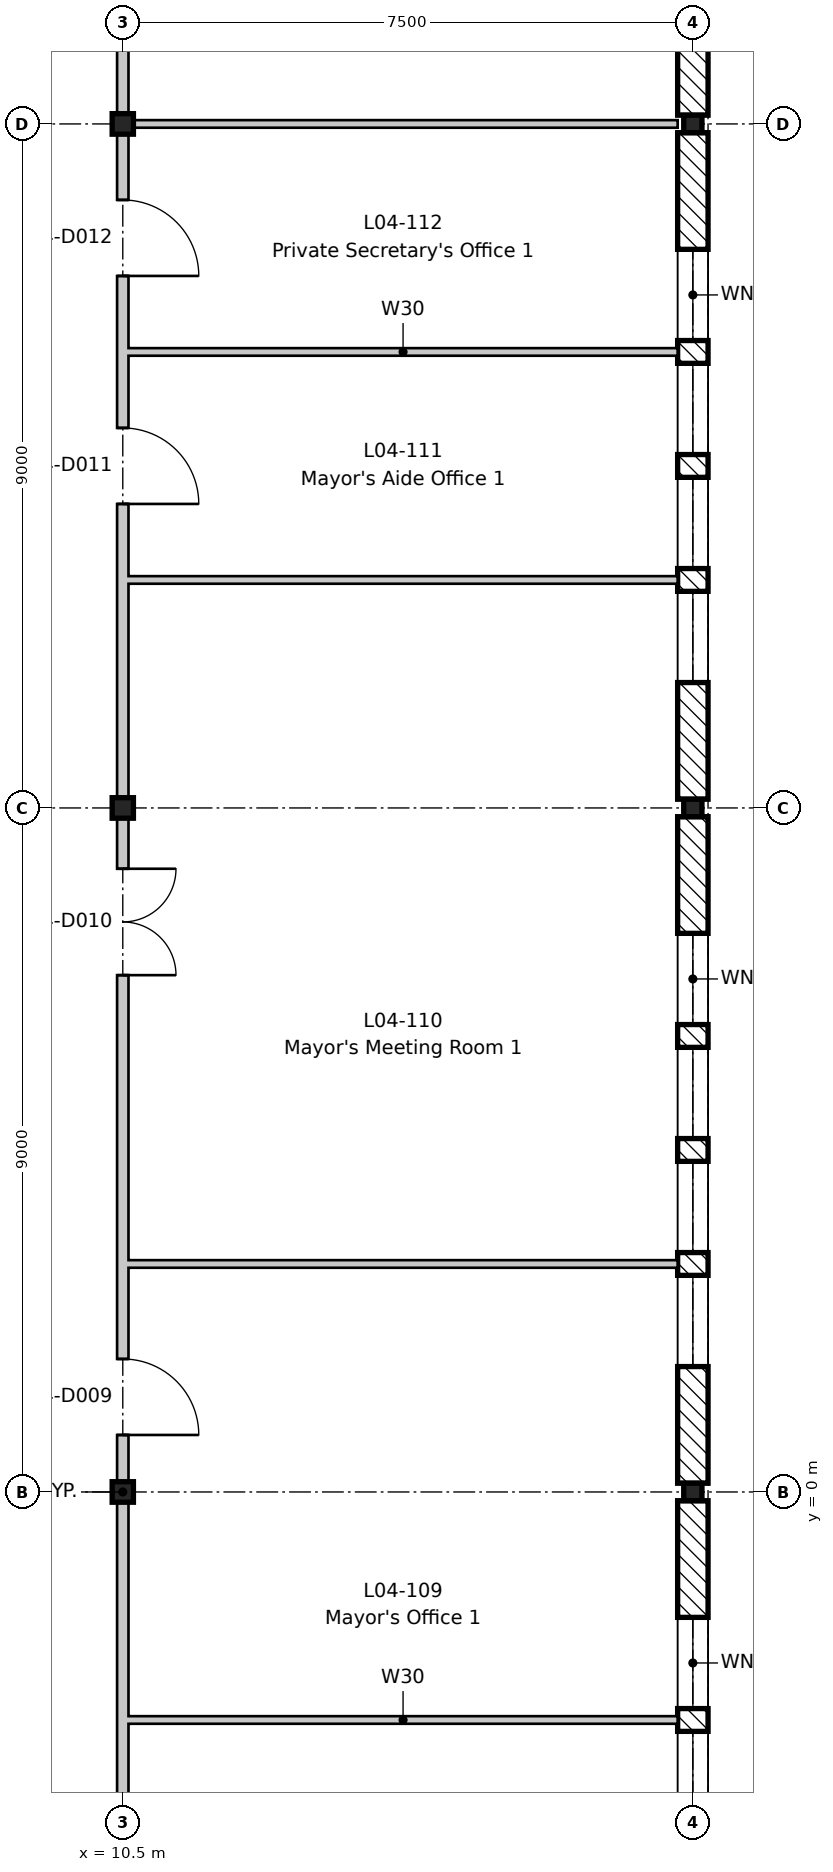
"""IFC4 building model, lengths in metres.
Left out: names, types, materials, properties, quantities, classifications, styles, units other than length and angle.
Written with IfcOpenShell. Run it as: python <this file> out.ifc"""

import sys

from ifc_helpers import new_model, si_unit, direction, frame, frame_2d, origin, origin_2d, place, context, subcontext, project, spatial, rectangle, i_section, extrude, element, fill, save


model = new_model("IFC4")
c1 = context("Model", 3, precision=1e-05, world=origin(), true_north=direction((0.0, 1.0)))
c2 = subcontext(c1, "Body", "Model", "MODEL_VIEW")
j1 = project(units=[si_unit("LENGTHUNIT", "METRE"), si_unit("PLANEANGLEUNIT", "RADIAN")], contexts=[c1])
p1 = place(None, origin())
s1 = spatial("IfcSite", under=j1, at=p1, CompositionType="ELEMENT")
p2 = place(p1, origin())
s2 = spatial("IfcBuilding", under=s1, at=p2, CompositionType="ELEMENT")
p3 = place(p2, frame((0.0, 0.0, 18.6)))
s3 = spatial("IfcBuildingStorey", under=s2, at=p3, CompositionType="ELEMENT", Elevation=18.6)
for number, where, z_axis, x_axis in (
    (1, (10.5, 0.0, -0.2), (0.0, 0.0, 1.0), (1.0, 0.0, 0.0)),
    (2, (10.5, 9.0, -0.2), (0.0, 0.0, 1.0), (1.0, 0.0, 0.0)),
    (3, (10.5, 18.0, -0.2), (0.0, 0.0, 1.0), (1.0, 0.0, 0.0)),
):
    element("IfcColumn", number, at=place(p3, frame(where, z_axis=z_axis, x_axis=x_axis)), inside=s3, PredefinedType="COLUMN", context=c2, shape_type="SweptSolid", body=[
        extrude(i_section(OverallWidth=0.28, OverallDepth=0.27, WebThickness=0.008, FlangeThickness=0.013, FilletRadius=0.024, at=origin_2d()), origin(), (0.0, 0.0, 1.0), 4.2),
    ])
for number, where, z_axis, x_axis in (
    (4, (18.0, 0.0, -0.2), (0.0, 0.0, 1.0), (1.0, 0.0, 0.0)),
    (5, (18.0, 9.0, -0.2), (0.0, 0.0, 1.0), (1.0, 0.0, 0.0)),
    (6, (18.0, 18.0, -0.2), (0.0, 0.0, 1.0), (1.0, 0.0, 0.0)),
):
    element("IfcColumn", number, at=place(p3, frame(where, z_axis=z_axis, x_axis=x_axis)), inside=s3, PredefinedType="COLUMN", context=c2, shape_type="SweptSolid", body=[
        extrude(i_section(OverallWidth=0.24, OverallDepth=0.23, WebThickness=0.008, FlangeThickness=0.012, FilletRadius=0.021, at=origin_2d()), origin(), (0.0, 0.0, 1.0), 4.2),
    ])
p4 = place(p3, frame((18.0, -0.115, 0.0), z_axis=(0.0, 0.0, 1.0), x_axis=(0.0, -1.0, 0.0)))
e7 = element("IfcWall", 7, at=p4, inside=s3, PredefinedType="STANDARD", context=c2, shape_type="SweptSolid", body=[
    extrude(rectangle(XDim=8.77, YDim=0.4, at=frame_2d((4.385, 0.0))), origin(), (0.0, 0.0, 1.0), 3.6),
])
p5 = place(p4, frame((6.035, 0.0, 0.6)))
e8 = element("IfcOpeningElement", 8, at=p5, cuts=e7, PredefinedType="OPENING", context=c2, shape_type="SweptSolid", body=[
    extrude(rectangle(XDim=1.2, YDim=2.7, at=frame_2d((0.6, 1.35))), frame((0.0, 0.21, 0.0), z_axis=(0.0, -1.0, 0.0), x_axis=(1.0, 0.0, 0.0)), (0.0, 0.0, 1.0), 0.42),
])
p6 = place(p4, frame((4.535, 0.0, 0.6)))
e9 = element("IfcOpeningElement", 9, at=p6, cuts=e7, PredefinedType="OPENING", context=c2, shape_type="SweptSolid", body=[
    extrude(rectangle(XDim=1.2, YDim=2.7, at=frame_2d((0.6, 1.35))), frame((0.0, 0.21, 0.0), z_axis=(0.0, -1.0, 0.0), x_axis=(1.0, 0.0, 0.0)), (0.0, 0.0, 1.0), 0.42),
])
p7 = place(p4, frame((3.035, 0.0, 0.6)))
e10 = element("IfcOpeningElement", 10, at=p7, cuts=e7, PredefinedType="OPENING", context=c2, shape_type="SweptSolid", body=[
    extrude(rectangle(XDim=1.2, YDim=2.7, at=frame_2d((0.6, 1.35))), frame((0.0, 0.21, 0.0), z_axis=(0.0, -1.0, 0.0), x_axis=(1.0, 0.0, 0.0)), (0.0, 0.0, 1.0), 0.42),
])
p8 = place(p4, frame((1.535, 0.0, 0.6)))
e11 = element("IfcOpeningElement", 11, at=p8, cuts=e7, PredefinedType="OPENING", context=c2, shape_type="SweptSolid", body=[
    extrude(rectangle(XDim=1.2, YDim=2.7, at=frame_2d((0.6, 1.35))), frame((0.0, 0.21, 0.0), z_axis=(0.0, -1.0, 0.0), x_axis=(1.0, 0.0, 0.0)), (0.0, 0.0, 1.0), 0.42),
])
p9 = place(p3, frame((18.0, 8.885, 0.0), z_axis=(0.0, 0.0, 1.0), x_axis=(0.0, -1.0, 0.0)))
e12 = element("IfcWall", 12, at=p9, inside=s3, PredefinedType="STANDARD", context=c2, shape_type="SweptSolid", body=[
    extrude(rectangle(XDim=8.77, YDim=0.4, at=frame_2d((4.385, 0.0))), origin(), (0.0, 0.0, 1.0), 3.6),
])
p10 = place(p9, frame((6.035, 0.0, 0.6)))
e13 = element("IfcOpeningElement", 13, at=p10, cuts=e12, PredefinedType="OPENING", context=c2, shape_type="SweptSolid", body=[
    extrude(rectangle(XDim=1.2, YDim=2.7, at=frame_2d((0.6, 1.35))), frame((0.0, 0.21, 0.0), z_axis=(0.0, -1.0, 0.0), x_axis=(1.0, 0.0, 0.0)), (0.0, 0.0, 1.0), 0.42),
])
p11 = place(p9, frame((4.535, 0.0, 0.6)))
e14 = element("IfcOpeningElement", 14, at=p11, cuts=e12, PredefinedType="OPENING", context=c2, shape_type="SweptSolid", body=[
    extrude(rectangle(XDim=1.2, YDim=2.7, at=frame_2d((0.6, 1.35))), frame((0.0, 0.21, 0.0), z_axis=(0.0, -1.0, 0.0), x_axis=(1.0, 0.0, 0.0)), (0.0, 0.0, 1.0), 0.42),
])
p12 = place(p9, frame((3.035, 0.0, 0.6)))
e15 = element("IfcOpeningElement", 15, at=p12, cuts=e12, PredefinedType="OPENING", context=c2, shape_type="SweptSolid", body=[
    extrude(rectangle(XDim=1.2, YDim=2.7, at=frame_2d((0.6, 1.35))), frame((0.0, 0.21, 0.0), z_axis=(0.0, -1.0, 0.0), x_axis=(1.0, 0.0, 0.0)), (0.0, 0.0, 1.0), 0.42),
])
p13 = place(p9, frame((1.535, 0.0, 0.6)))
e16 = element("IfcOpeningElement", 16, at=p13, cuts=e12, PredefinedType="OPENING", context=c2, shape_type="SweptSolid", body=[
    extrude(rectangle(XDim=1.2, YDim=2.7, at=frame_2d((0.6, 1.35))), frame((0.0, 0.21, 0.0), z_axis=(0.0, -1.0, 0.0), x_axis=(1.0, 0.0, 0.0)), (0.0, 0.0, 1.0), 0.42),
])
p14 = place(p3, frame((18.0, 17.885, 0.0), z_axis=(0.0, 0.0, 1.0), x_axis=(0.0, -1.0, 0.0)))
e17 = element("IfcWall", 17, at=p14, inside=s3, PredefinedType="STANDARD", context=c2, shape_type="SweptSolid", body=[
    extrude(rectangle(XDim=8.77, YDim=0.4, at=frame_2d((4.385, 0.0))), origin(), (0.0, 0.0, 1.0), 3.6),
])
p15 = place(p14, frame((6.035, 0.0, 0.6)))
e18 = element("IfcOpeningElement", 18, at=p15, cuts=e17, PredefinedType="OPENING", context=c2, shape_type="SweptSolid", body=[
    extrude(rectangle(XDim=1.2, YDim=2.7, at=frame_2d((0.6, 1.35))), frame((0.0, 0.21, 0.0), z_axis=(0.0, -1.0, 0.0), x_axis=(1.0, 0.0, 0.0)), (0.0, 0.0, 1.0), 0.42),
])
p16 = place(p14, frame((4.535, 0.0, 0.6)))
e19 = element("IfcOpeningElement", 19, at=p16, cuts=e17, PredefinedType="OPENING", context=c2, shape_type="SweptSolid", body=[
    extrude(rectangle(XDim=1.2, YDim=2.7, at=frame_2d((0.6, 1.35))), frame((0.0, 0.21, 0.0), z_axis=(0.0, -1.0, 0.0), x_axis=(1.0, 0.0, 0.0)), (0.0, 0.0, 1.0), 0.42),
])
p17 = place(p14, frame((3.035, 0.0, 0.6)))
e20 = element("IfcOpeningElement", 20, at=p17, cuts=e17, PredefinedType="OPENING", context=c2, shape_type="SweptSolid", body=[
    extrude(rectangle(XDim=1.2, YDim=2.7, at=frame_2d((0.6, 1.35))), frame((0.0, 0.21, 0.0), z_axis=(0.0, -1.0, 0.0), x_axis=(1.0, 0.0, 0.0)), (0.0, 0.0, 1.0), 0.42),
])
p18 = place(p14, frame((1.535, 0.0, 0.6)))
e21 = element("IfcOpeningElement", 21, at=p18, cuts=e17, PredefinedType="OPENING", context=c2, shape_type="SweptSolid", body=[
    extrude(rectangle(XDim=1.2, YDim=2.7, at=frame_2d((0.6, 1.35))), frame((0.0, 0.21, 0.0), z_axis=(0.0, -1.0, 0.0), x_axis=(1.0, 0.0, 0.0)), (0.0, 0.0, 1.0), 0.42),
])
p19 = place(p3, frame((18.0, 26.885, 0.0), z_axis=(0.0, 0.0, 1.0), x_axis=(0.0, -1.0, 0.0)))
e22 = element("IfcWall", 22, at=p19, inside=s3, PredefinedType="STANDARD", context=c2, shape_type="SweptSolid", body=[
    extrude(rectangle(XDim=8.77, YDim=0.4, at=frame_2d((4.385, 0.0))), origin(), (0.0, 0.0, 1.0), 3.6),
])
for number, where, z_axis, x_axis in (
    (23, (10.575, -3.0, 0.0), (0.0, 0.0, 1.0), (1.0, 0.0, 0.0)),
    (24, (10.575, 3.0, 0.0), (0.0, 0.0, 1.0), (1.0, 0.0, 0.0)),
    (25, (10.575, 12.0, 0.0), (0.0, 0.0, 1.0), (1.0, 0.0, 0.0)),
    (26, (10.575, 15.0, 0.0), (0.0, 0.0, 1.0), (1.0, 0.0, 0.0)),
):
    element("IfcWall", number, at=place(p3, frame(where, z_axis=z_axis, x_axis=x_axis)), inside=s3, PredefinedType="PARTITIONING", context=c2, shape_type="SweptSolid", body=[
        extrude(rectangle(XDim=7.225, YDim=0.1, at=frame_2d((3.613, 0.0))), origin(), (0.0, 0.0, 1.0), 4.0),
    ])
p20 = place(p3, frame((10.575, 18.0, 0.0), z_axis=(0.0, 0.0, 1.0), x_axis=(1.0, 0.0, 0.0)))
e27 = element("IfcWall", 27, at=p20, inside=s3, PredefinedType="PARTITIONING", context=c2, shape_type="SweptSolid", body=[
    extrude(rectangle(XDim=7.225, YDim=0.1, at=frame_2d((3.613, 0.0))), origin(), (0.0, 0.0, 1.0), 3.65),
])
p21 = place(p3, frame((10.5, -8.8, 0.0), z_axis=(0.0, 0.0, 1.0), x_axis=(0.0, 1.0, 0.0)))
e28 = element("IfcWall", 28, at=p21, inside=s3, PredefinedType="PARTITIONING", context=c2, shape_type="SweptSolid", body=[
    extrude(rectangle(XDim=79.3, YDim=0.15, at=frame_2d((39.65, 0.0))), origin(), (0.0, 0.0, 1.0), 3.48),
])
p22 = place(p21, frame((2.3, 0.0, 0.0)))
e29 = element("IfcOpeningElement", 29, at=p22, cuts=e28, PredefinedType="OPENING", context=c2, shape_type="SweptSolid", body=[
    extrude(rectangle(XDim=1.0, YDim=2.1, at=frame_2d((0.5, 1.05))), frame((0.0, 0.085, 0.0), z_axis=(0.0, -1.0, 0.0), x_axis=(1.0, 0.0, 0.0)), (0.0, 0.0, 1.0), 0.17),
])
p23 = place(p21, frame((9.55, 0.0, 0.0)))
e30 = element("IfcOpeningElement", 30, at=p23, cuts=e28, PredefinedType="OPENING", context=c2, shape_type="SweptSolid", body=[
    extrude(rectangle(XDim=1.0, YDim=2.1, at=frame_2d((0.5, 1.05))), frame((0.0, 0.085, 0.0), z_axis=(0.0, -1.0, 0.0), x_axis=(1.0, 0.0, 0.0)), (0.0, 0.0, 1.0), 0.17),
])
p24 = place(p21, frame((15.6, 0.0, 0.0)))
e31 = element("IfcOpeningElement", 31, at=p24, cuts=e28, PredefinedType="OPENING", context=c2, shape_type="SweptSolid", body=[
    extrude(rectangle(XDim=1.4, YDim=2.1, at=frame_2d((0.7, 1.05))), frame((0.0, 0.085, 0.0), z_axis=(0.0, -1.0, 0.0), x_axis=(1.0, 0.0, 0.0)), (0.0, 0.0, 1.0), 0.17),
])
p25 = place(p21, frame((21.8, 0.0, 0.0)))
e32 = element("IfcOpeningElement", 32, at=p25, cuts=e28, PredefinedType="OPENING", context=c2, shape_type="SweptSolid", body=[
    extrude(rectangle(XDim=1.0, YDim=2.1, at=frame_2d((0.5, 1.05))), frame((0.0, 0.085, 0.0), z_axis=(0.0, -1.0, 0.0), x_axis=(1.0, 0.0, 0.0)), (0.0, 0.0, 1.0), 0.17),
])
p26 = place(p21, frame((24.8, 0.0, 0.0)))
e33 = element("IfcOpeningElement", 33, at=p26, cuts=e28, PredefinedType="OPENING", context=c2, shape_type="SweptSolid", body=[
    extrude(rectangle(XDim=1.0, YDim=2.1, at=frame_2d((0.5, 1.05))), frame((0.0, 0.085, 0.0), z_axis=(0.0, -1.0, 0.0), x_axis=(1.0, 0.0, 0.0)), (0.0, 0.0, 1.0), 0.17),
])
p27 = place(p21, frame((30.6, 0.0, 0.0)))
e34 = element("IfcOpeningElement", 34, at=p27, cuts=e28, PredefinedType="OPENING", context=c2, shape_type="SweptSolid", body=[
    extrude(rectangle(XDim=1.4, YDim=2.1, at=frame_2d((0.7, 1.05))), frame((0.0, 0.085, 0.0), z_axis=(0.0, -1.0, 0.0), x_axis=(1.0, 0.0, 0.0)), (0.0, 0.0, 1.0), 0.17),
])
p28 = place(p21, frame((38.3, 0.0, 0.0)))
e35 = element("IfcOpeningElement", 35, at=p28, cuts=e28, PredefinedType="OPENING", context=c2, shape_type="SweptSolid", body=[
    extrude(rectangle(XDim=1.0, YDim=2.1, at=frame_2d((0.5, 1.05))), frame((0.0, 0.085, 0.0), z_axis=(0.0, -1.0, 0.0), x_axis=(1.0, 0.0, 0.0)), (0.0, 0.0, 1.0), 0.17),
])
p29 = place(p21, frame((42.8, 0.0, 0.0)))
e36 = element("IfcOpeningElement", 36, at=p29, cuts=e28, PredefinedType="OPENING", context=c2, shape_type="SweptSolid", body=[
    extrude(rectangle(XDim=1.0, YDim=2.1, at=frame_2d((0.5, 1.05))), frame((0.0, 0.085, 0.0), z_axis=(0.0, -1.0, 0.0), x_axis=(1.0, 0.0, 0.0)), (0.0, 0.0, 1.0), 0.17),
])
p30 = place(p21, frame((45.8, 0.0, 0.0)))
e37 = element("IfcOpeningElement", 37, at=p30, cuts=e28, PredefinedType="OPENING", context=c2, shape_type="SweptSolid", body=[
    extrude(rectangle(XDim=1.0, YDim=2.1, at=frame_2d((0.5, 1.05))), frame((0.0, 0.085, 0.0), z_axis=(0.0, -1.0, 0.0), x_axis=(1.0, 0.0, 0.0)), (0.0, 0.0, 1.0), 0.17),
])
p31 = place(p21, frame((50.3, 0.0, 0.0)))
e38 = element("IfcOpeningElement", 38, at=p31, cuts=e28, PredefinedType="OPENING", context=c2, shape_type="SweptSolid", body=[
    extrude(rectangle(XDim=1.0, YDim=2.1, at=frame_2d((0.5, 1.05))), frame((0.0, 0.085, 0.0), z_axis=(0.0, -1.0, 0.0), x_axis=(1.0, 0.0, 0.0)), (0.0, 0.0, 1.0), 0.17),
])
p32 = place(p21, frame((54.8, 0.0, 0.0)))
e39 = element("IfcOpeningElement", 39, at=p32, cuts=e28, PredefinedType="OPENING", context=c2, shape_type="SweptSolid", body=[
    extrude(rectangle(XDim=1.0, YDim=2.1, at=frame_2d((0.5, 1.05))), frame((0.0, 0.085, 0.0), z_axis=(0.0, -1.0, 0.0), x_axis=(1.0, 0.0, 0.0)), (0.0, 0.0, 1.0), 0.17),
])
p33 = place(p21, frame((57.8, 0.0, 0.0)))
e40 = element("IfcOpeningElement", 40, at=p33, cuts=e28, PredefinedType="OPENING", context=c2, shape_type="SweptSolid", body=[
    extrude(rectangle(XDim=1.0, YDim=2.1, at=frame_2d((0.5, 1.05))), frame((0.0, 0.085, 0.0), z_axis=(0.0, -1.0, 0.0), x_axis=(1.0, 0.0, 0.0)), (0.0, 0.0, 1.0), 0.17),
])
p34 = place(p21, frame((63.6, 0.0, 0.0)))
e41 = element("IfcOpeningElement", 41, at=p34, cuts=e28, PredefinedType="OPENING", context=c2, shape_type="SweptSolid", body=[
    extrude(rectangle(XDim=1.4, YDim=2.1, at=frame_2d((0.7, 1.05))), frame((0.0, 0.085, 0.0), z_axis=(0.0, -1.0, 0.0), x_axis=(1.0, 0.0, 0.0)), (0.0, 0.0, 1.0), 0.17),
])
p35 = place(p21, frame((69.8, 0.0, 0.0)))
e42 = element("IfcOpeningElement", 42, at=p35, cuts=e28, PredefinedType="OPENING", context=c2, shape_type="SweptSolid", body=[
    extrude(rectangle(XDim=1.0, YDim=2.1, at=frame_2d((0.5, 1.05))), frame((0.0, 0.085, 0.0), z_axis=(0.0, -1.0, 0.0), x_axis=(1.0, 0.0, 0.0)), (0.0, 0.0, 1.0), 0.17),
])
p36 = place(p21, frame((72.8, 0.0, 0.0)))
e43 = element("IfcOpeningElement", 43, at=p36, cuts=e28, PredefinedType="OPENING", context=c2, shape_type="SweptSolid", body=[
    extrude(rectangle(XDim=1.0, YDim=2.1, at=frame_2d((0.5, 1.05))), frame((0.0, 0.085, 0.0), z_axis=(0.0, -1.0, 0.0), x_axis=(1.0, 0.0, 0.0)), (0.0, 0.0, 1.0), 0.17),
])
p37 = place(p7, origin())
e44 = element("IfcWindow", 44, at=p37, inside=s3, PartitioningType="SINGLE_PANEL", PredefinedType="WINDOW", context=c2, shape_type="SweptSolid", body=[
    extrude(rectangle(XDim=1.2, YDim=2.7, at=frame_2d((0.6, 1.35))), frame((0.0, 0.03, 0.0), z_axis=(0.0, -1.0, 0.0), x_axis=(1.0, 0.0, 0.0)), (0.0, 0.0, 1.0), 0.06),
])
fill(e10, e44)
p38 = place(p8, origin())
e45 = element("IfcWindow", 45, at=p38, inside=s3, PartitioningType="SINGLE_PANEL", PredefinedType="WINDOW", context=c2, shape_type="SweptSolid", body=[
    extrude(rectangle(XDim=1.2, YDim=2.7, at=frame_2d((0.6, 1.35))), frame((0.0, 0.03, 0.0), z_axis=(0.0, -1.0, 0.0), x_axis=(1.0, 0.0, 0.0)), (0.0, 0.0, 1.0), 0.06),
])
fill(e11, e45)
p39 = place(p10, origin())
e46 = element("IfcWindow", 46, at=p39, inside=s3, PartitioningType="SINGLE_PANEL", PredefinedType="WINDOW", context=c2, shape_type="SweptSolid", body=[
    extrude(rectangle(XDim=1.2, YDim=2.7, at=frame_2d((0.6, 1.35))), frame((0.0, 0.03, 0.0), z_axis=(0.0, -1.0, 0.0), x_axis=(1.0, 0.0, 0.0)), (0.0, 0.0, 1.0), 0.06),
])
fill(e13, e46)
p40 = place(p11, origin())
e47 = element("IfcWindow", 47, at=p40, inside=s3, PartitioningType="SINGLE_PANEL", PredefinedType="WINDOW", context=c2, shape_type="SweptSolid", body=[
    extrude(rectangle(XDim=1.2, YDim=2.7, at=frame_2d((0.6, 1.35))), frame((0.0, 0.03, 0.0), z_axis=(0.0, -1.0, 0.0), x_axis=(1.0, 0.0, 0.0)), (0.0, 0.0, 1.0), 0.06),
])
fill(e14, e47)
p41 = place(p12, origin())
e48 = element("IfcWindow", 48, at=p41, inside=s3, PartitioningType="SINGLE_PANEL", PredefinedType="WINDOW", context=c2, shape_type="SweptSolid", body=[
    extrude(rectangle(XDim=1.2, YDim=2.7, at=frame_2d((0.6, 1.35))), frame((0.0, 0.03, 0.0), z_axis=(0.0, -1.0, 0.0), x_axis=(1.0, 0.0, 0.0)), (0.0, 0.0, 1.0), 0.06),
])
fill(e15, e48)
p42 = place(p13, origin())
e49 = element("IfcWindow", 49, at=p42, inside=s3, PartitioningType="SINGLE_PANEL", PredefinedType="WINDOW", context=c2, shape_type="SweptSolid", body=[
    extrude(rectangle(XDim=1.2, YDim=2.7, at=frame_2d((0.6, 1.35))), frame((0.0, 0.03, 0.0), z_axis=(0.0, -1.0, 0.0), x_axis=(1.0, 0.0, 0.0)), (0.0, 0.0, 1.0), 0.06),
])
fill(e16, e49)
p43 = place(p15, origin())
e50 = element("IfcWindow", 50, at=p43, inside=s3, PartitioningType="SINGLE_PANEL", PredefinedType="WINDOW", context=c2, shape_type="SweptSolid", body=[
    extrude(rectangle(XDim=1.2, YDim=2.7, at=frame_2d((0.6, 1.35))), frame((0.0, 0.03, 0.0), z_axis=(0.0, -1.0, 0.0), x_axis=(1.0, 0.0, 0.0)), (0.0, 0.0, 1.0), 0.06),
])
fill(e18, e50)
p44 = place(p16, origin())
e51 = element("IfcWindow", 51, at=p44, inside=s3, PartitioningType="SINGLE_PANEL", PredefinedType="WINDOW", context=c2, shape_type="SweptSolid", body=[
    extrude(rectangle(XDim=1.2, YDim=2.7, at=frame_2d((0.6, 1.35))), frame((0.0, 0.03, 0.0), z_axis=(0.0, -1.0, 0.0), x_axis=(1.0, 0.0, 0.0)), (0.0, 0.0, 1.0), 0.06),
])
fill(e19, e51)
p45 = place(p17, origin())
e52 = element("IfcWindow", 52, at=p45, inside=s3, PartitioningType="SINGLE_PANEL", PredefinedType="WINDOW", context=c2, shape_type="SweptSolid", body=[
    extrude(rectangle(XDim=1.2, YDim=2.7, at=frame_2d((0.6, 1.35))), frame((0.0, 0.03, 0.0), z_axis=(0.0, -1.0, 0.0), x_axis=(1.0, 0.0, 0.0)), (0.0, 0.0, 1.0), 0.06),
])
fill(e20, e52)
p46 = place(p18, origin())
e53 = element("IfcWindow", 53, at=p46, inside=s3, PartitioningType="SINGLE_PANEL", PredefinedType="WINDOW", context=c2, shape_type="SweptSolid", body=[
    extrude(rectangle(XDim=1.2, YDim=2.7, at=frame_2d((0.6, 1.35))), frame((0.0, 0.03, 0.0), z_axis=(0.0, -1.0, 0.0), x_axis=(1.0, 0.0, 0.0)), (0.0, 0.0, 1.0), 0.06),
])
fill(e21, e53)
p47 = place(p23, frame((1.0, 0.0, 0.0), z_axis=(0.0, 0.0, 1.0), x_axis=(-1.0, 0.0, 0.0)))
e54 = element("IfcDoor", 54, at=p47, inside=s3, OperationType="SINGLE_SWING_RIGHT", PredefinedType="DOOR", context=c2, shape_type="SweptSolid", body=[
    extrude(rectangle(XDim=1.0, YDim=2.1, at=frame_2d((0.5, 1.05))), frame((0.0, 0.025, 0.0), z_axis=(0.0, -1.0, 0.0), x_axis=(1.0, 0.0, 0.0)), (0.0, 0.0, 1.0), 0.05),
])
fill(e30, e54)
p48 = place(p24, frame((1.4, 0.0, 0.0), z_axis=(0.0, 0.0, 1.0), x_axis=(-1.0, 0.0, 0.0)))
e55 = element("IfcDoor", 55, at=p48, inside=s3, OperationType="DOUBLE_DOOR_SINGLE_SWING", PredefinedType="DOOR", context=c2, shape_type="SweptSolid", body=[
    extrude(rectangle(XDim=1.4, YDim=2.1, at=frame_2d((0.7, 1.05))), frame((0.0, 0.025, 0.0), z_axis=(0.0, -1.0, 0.0), x_axis=(1.0, 0.0, 0.0)), (0.0, 0.0, 1.0), 0.05),
])
fill(e31, e55)
p49 = place(p25, frame((1.0, 0.0, 0.0), z_axis=(0.0, 0.0, 1.0), x_axis=(-1.0, 0.0, 0.0)))
e56 = element("IfcDoor", 56, at=p49, inside=s3, OperationType="SINGLE_SWING_RIGHT", PredefinedType="DOOR", context=c2, shape_type="SweptSolid", body=[
    extrude(rectangle(XDim=1.0, YDim=2.1, at=frame_2d((0.5, 1.05))), frame((0.0, 0.025, 0.0), z_axis=(0.0, -1.0, 0.0), x_axis=(1.0, 0.0, 0.0)), (0.0, 0.0, 1.0), 0.05),
])
fill(e32, e56)
p50 = place(p26, frame((1.0, 0.0, 0.0), z_axis=(0.0, 0.0, 1.0), x_axis=(-1.0, 0.0, 0.0)))
e57 = element("IfcDoor", 57, at=p50, inside=s3, OperationType="SINGLE_SWING_RIGHT", PredefinedType="DOOR", context=c2, shape_type="SweptSolid", body=[
    extrude(rectangle(XDim=1.0, YDim=2.1, at=frame_2d((0.5, 1.05))), frame((0.0, 0.025, 0.0), z_axis=(0.0, -1.0, 0.0), x_axis=(1.0, 0.0, 0.0)), (0.0, 0.0, 1.0), 0.05),
])
fill(e33, e57)
save(model, sys.argv[1])
